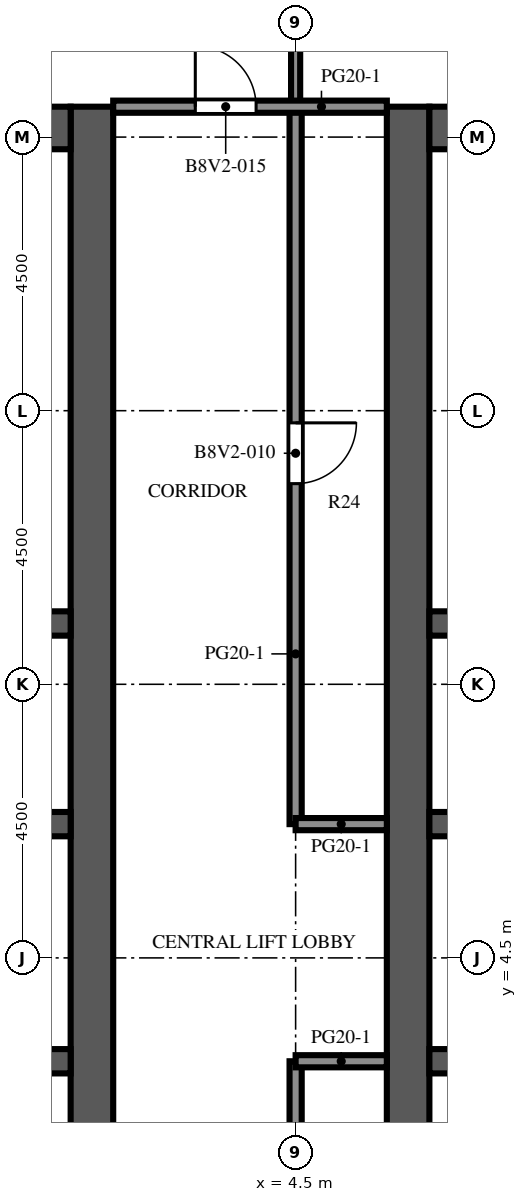
"""IFC4 building model, lengths in metres.
Left out: names, types, materials, properties, quantities, classifications, styles, units other than length and angle.
Written with IfcOpenShell. Run it as: python <this file> out.ifc"""

import sys

from ifc_helpers import new_model, si_unit, direction, frame, frame_2d, origin, place, context, subcontext, project, spatial, rectangle, extrude, element, fill, save


model = new_model("IFC4")
c1 = context("Model", 3, precision=1e-05, world=origin(), true_north=direction((0.0, 1.0)))
c2 = subcontext(c1, "Body", "Model", "MODEL_VIEW")
j1 = project(units=[si_unit("LENGTHUNIT", "METRE"), si_unit("PLANEANGLEUNIT", "RADIAN")], contexts=[c1])
p1 = place(None, origin())
s1 = spatial("IfcSite", under=j1, at=p1, CompositionType="ELEMENT")
p2 = place(p1, origin())
s2 = spatial("IfcBuilding", under=s1, at=p2, CompositionType="ELEMENT")
p3 = place(p2, frame((0.0, 0.0, 282.7)))
s3 = spatial("IfcBuildingStorey", under=s2, at=p3, CompositionType="ELEMENT", Elevation=282.7)
p4 = place(p3, frame((1.15, -9.0, 0.0), z_axis=(0.0, 0.0, 1.0), x_axis=(0.0, 1.0, 0.0)))
e1 = element("IfcWall", 1, at=p4, inside=s3, PredefinedType="SHEAR", context=c2, shape_type="SweptSolid", body=[
    extrude(rectangle(XDim=27.5, YDim=0.7, at=frame_2d((13.75, 0.0))), origin(), (0.0, 0.0, 1.0), 4.1),
])
p5 = place(p4, frame((12.55, 0.0, 0.0)))
e2 = element("IfcOpeningElement", 2, at=p5, cuts=e1, PredefinedType="OPENING", context=c2, shape_type="SweptSolid", body=[
    extrude(rectangle(XDim=2.4, YDim=2.4, at=frame_2d((1.2, 1.2))), frame((0.0, 0.36, 0.0), z_axis=(0.0, -1.0, 0.0), x_axis=(1.0, 0.0, 0.0)), (0.0, 0.0, 1.0), 0.72),
])
p6 = place(p4, frame((3.9, 0.0, 0.0)))
e3 = element("IfcOpeningElement", 3, at=p6, cuts=e1, PredefinedType="OPENING", context=c2, shape_type="SweptSolid", body=[
    extrude(rectangle(XDim=1.2, YDim=2.1, at=frame_2d((0.6, 1.05))), frame((0.0, 0.36, 0.0), z_axis=(0.0, -1.0, 0.0), x_axis=(1.0, 0.0, 0.0)), (0.0, 0.0, 1.0), 0.72),
])
p7 = place(p4, frame((22.4, 0.0, 0.0)))
e4 = element("IfcOpeningElement", 4, at=p7, cuts=e1, PredefinedType="OPENING", context=c2, shape_type="SweptSolid", body=[
    extrude(rectangle(XDim=1.2, YDim=2.1, at=frame_2d((0.6, 1.05))), frame((0.0, 0.36, 0.0), z_axis=(0.0, -1.0, 0.0), x_axis=(1.0, 0.0, 0.0)), (0.0, 0.0, 1.0), 0.72),
])
p8 = place(p3, frame((-9.8, 18.15, 0.0), z_axis=(0.0, 0.0, 1.0), x_axis=(1.0, 0.0, 0.0)))
e5 = element("IfcWall", 5, at=p8, inside=s3, PredefinedType="SHEAR", context=c2, shape_type="SweptSolid", body=[
    extrude(rectangle(XDim=10.6, YDim=0.7, at=frame_2d((5.3, 0.0))), origin(), (0.0, 0.0, 1.0), 4.1),
])
p9 = place(p3, frame((-9.8, 2.8, 0.0), z_axis=(0.0, 0.0, 1.0), x_axis=(1.0, 0.0, 0.0)))
e6 = element("IfcWall", 6, at=p9, inside=s3, PredefinedType="SHEAR", context=c2, shape_type="SweptSolid", body=[
    extrude(rectangle(XDim=10.6, YDim=0.4, at=frame_2d((5.3, 0.0))), origin(), (0.0, 0.0, 1.0), 4.1),
])
p10 = place(p9, frame((0.688, 0.0, 0.0)))
e7 = element("IfcOpeningElement", 7, at=p10, cuts=e6, PredefinedType="OPENING", context=c2, shape_type="SweptSolid", body=[
    extrude(rectangle(XDim=1.1, YDim=2.1, at=frame_2d((0.55, 1.05))), frame((0.0, 0.21, 0.0), z_axis=(0.0, -1.0, 0.0), x_axis=(1.0, 0.0, 0.0)), (0.0, 0.0, 1.0), 0.42),
])
p11 = place(p9, frame((3.438, 0.0, 0.0)))
e8 = element("IfcOpeningElement", 8, at=p11, cuts=e6, PredefinedType="OPENING", context=c2, shape_type="SweptSolid", body=[
    extrude(rectangle(XDim=1.1, YDim=2.1, at=frame_2d((0.55, 1.05))), frame((0.0, 0.21, 0.0), z_axis=(0.0, -1.0, 0.0), x_axis=(1.0, 0.0, 0.0)), (0.0, 0.0, 1.0), 0.42),
])
p12 = place(p9, frame((6.113, 0.0, 0.0)))
e9 = element("IfcOpeningElement", 9, at=p12, cuts=e6, PredefinedType="OPENING", context=c2, shape_type="SweptSolid", body=[
    extrude(rectangle(XDim=1.0, YDim=2.1, at=frame_2d((0.5, 1.05))), frame((0.0, 0.21, 0.0), z_axis=(0.0, -1.0, 0.0), x_axis=(1.0, 0.0, 0.0)), (0.0, 0.0, 1.0), 0.42),
])
p13 = place(p9, frame((8.863, 0.0, 0.0)))
e10 = element("IfcOpeningElement", 10, at=p13, cuts=e6, PredefinedType="OPENING", context=c2, shape_type="SweptSolid", body=[
    extrude(rectangle(XDim=1.0, YDim=2.1, at=frame_2d((0.5, 1.05))), frame((0.0, 0.21, 0.0), z_axis=(0.0, -1.0, 0.0), x_axis=(1.0, 0.0, 0.0)), (0.0, 0.0, 1.0), 0.42),
])
p14 = place(p3, frame((-9.8, 6.7, 0.0), z_axis=(0.0, 0.0, 1.0), x_axis=(1.0, 0.0, 0.0)))
e11 = element("IfcWall", 11, at=p14, inside=s3, PredefinedType="SHEAR", context=c2, shape_type="SweptSolid", body=[
    extrude(rectangle(XDim=10.6, YDim=0.4, at=frame_2d((5.3, 0.0))), origin(), (0.0, 0.0, 1.0), 4.1),
])
p15 = place(p14, frame((3.438, 0.0, 0.0)))
e12 = element("IfcOpeningElement", 12, at=p15, cuts=e11, PredefinedType="OPENING", context=c2, shape_type="SweptSolid", body=[
    extrude(rectangle(XDim=1.1, YDim=2.1, at=frame_2d((0.55, 1.05))), frame((0.0, 0.21, 0.0), z_axis=(0.0, -1.0, 0.0), x_axis=(1.0, 0.0, 0.0)), (0.0, 0.0, 1.0), 0.42),
])
p16 = place(p14, frame((6.062, 0.0, 0.0)))
e13 = element("IfcOpeningElement", 13, at=p16, cuts=e11, PredefinedType="OPENING", context=c2, shape_type="SweptSolid", body=[
    extrude(rectangle(XDim=1.1, YDim=2.1, at=frame_2d((0.55, 1.05))), frame((0.0, 0.21, 0.0), z_axis=(0.0, -1.0, 0.0), x_axis=(1.0, 0.0, 0.0)), (0.0, 0.0, 1.0), 0.42),
])
p17 = place(p14, frame((8.812, 0.0, 0.0)))
e14 = element("IfcOpeningElement", 14, at=p17, cuts=e11, PredefinedType="OPENING", context=c2, shape_type="SweptSolid", body=[
    extrude(rectangle(XDim=1.1, YDim=2.1, at=frame_2d((0.55, 1.05))), frame((0.0, 0.21, 0.0), z_axis=(0.0, -1.0, 0.0), x_axis=(1.0, 0.0, 0.0)), (0.0, 0.0, 1.0), 0.42),
])
p18 = place(p14, frame((0.738, 0.0, 0.0)))
e15 = element("IfcOpeningElement", 15, at=p18, cuts=e11, PredefinedType="OPENING", context=c2, shape_type="SweptSolid", body=[
    extrude(rectangle(XDim=1.0, YDim=2.1, at=frame_2d((0.5, 1.05))), frame((0.0, 0.21, 0.0), z_axis=(0.0, -1.0, 0.0), x_axis=(1.0, 0.0, 0.0)), (0.0, 0.0, 1.0), 0.42),
])
p19 = place(p3, frame((-9.8, 10.0, 0.0), z_axis=(0.0, 0.0, 1.0), x_axis=(1.0, 0.0, 0.0)))
e16 = element("IfcWall", 16, at=p19, inside=s3, PredefinedType="SHEAR", context=c2, shape_type="SweptSolid", body=[
    extrude(rectangle(XDim=10.6, YDim=0.4, at=frame_2d((5.3, 0.0))), origin(), (0.0, 0.0, 1.0), 4.1),
])
p20 = place(p3, frame((6.35, -9.0, 0.0), z_axis=(0.0, 0.0, 1.0), x_axis=(0.0, 1.0, 0.0)))
e17 = element("IfcWall", 17, at=p20, inside=s3, PredefinedType="SHEAR", context=c2, shape_type="SweptSolid", body=[
    extrude(rectangle(XDim=27.5, YDim=0.7, at=frame_2d((13.75, 0.0))), origin(), (0.0, 0.0, 1.0), 4.1),
])
p21 = place(p20, frame((12.55, 0.0, 0.0)))
e18 = element("IfcOpeningElement", 18, at=p21, cuts=e17, PredefinedType="OPENING", context=c2, shape_type="SweptSolid", body=[
    extrude(rectangle(XDim=2.4, YDim=2.4, at=frame_2d((1.2, 1.2))), frame((0.0, 0.36, 0.0), z_axis=(0.0, -1.0, 0.0), x_axis=(1.0, 0.0, 0.0)), (0.0, 0.0, 1.0), 0.72),
])
p22 = place(p20, frame((3.9, 0.0, 0.0)))
e19 = element("IfcOpeningElement", 19, at=p22, cuts=e17, PredefinedType="OPENING", context=c2, shape_type="SweptSolid", body=[
    extrude(rectangle(XDim=1.2, YDim=2.1, at=frame_2d((0.6, 1.05))), frame((0.0, 0.36, 0.0), z_axis=(0.0, -1.0, 0.0), x_axis=(1.0, 0.0, 0.0)), (0.0, 0.0, 1.0), 0.72),
])
p23 = place(p20, frame((22.4, 0.0, 0.0)))
e20 = element("IfcOpeningElement", 20, at=p23, cuts=e17, PredefinedType="OPENING", context=c2, shape_type="SweptSolid", body=[
    extrude(rectangle(XDim=1.2, YDim=2.1, at=frame_2d((0.6, 1.05))), frame((0.0, 0.36, 0.0), z_axis=(0.0, -1.0, 0.0), x_axis=(1.0, 0.0, 0.0)), (0.0, 0.0, 1.0), 0.72),
])
p24 = place(p3, frame((6.7, 18.15, 0.0), z_axis=(0.0, 0.0, 1.0), x_axis=(1.0, 0.0, 0.0)))
e21 = element("IfcWall", 21, at=p24, inside=s3, PredefinedType="SHEAR", context=c2, shape_type="SweptSolid", body=[
    extrude(rectangle(XDim=10.6, YDim=0.7, at=frame_2d((5.3, 0.0))), origin(), (0.0, 0.0, 1.0), 4.1),
])
p25 = place(p3, frame((6.7, 2.8, 0.0), z_axis=(0.0, 0.0, 1.0), x_axis=(1.0, 0.0, 0.0)))
e22 = element("IfcWall", 22, at=p25, inside=s3, PredefinedType="SHEAR", context=c2, shape_type="SweptSolid", body=[
    extrude(rectangle(XDim=10.6, YDim=0.4, at=frame_2d((5.3, 0.0))), origin(), (0.0, 0.0, 1.0), 4.1),
])
p26 = place(p25, frame((0.688, 0.0, 0.0)))
e23 = element("IfcOpeningElement", 23, at=p26, cuts=e22, PredefinedType="OPENING", context=c2, shape_type="SweptSolid", body=[
    extrude(rectangle(XDim=1.1, YDim=2.1, at=frame_2d((0.55, 1.05))), frame((0.0, 0.21, 0.0), z_axis=(0.0, -1.0, 0.0), x_axis=(1.0, 0.0, 0.0)), (0.0, 0.0, 1.0), 0.42),
])
p27 = place(p25, frame((3.438, 0.0, 0.0)))
e24 = element("IfcOpeningElement", 24, at=p27, cuts=e22, PredefinedType="OPENING", context=c2, shape_type="SweptSolid", body=[
    extrude(rectangle(XDim=1.1, YDim=2.1, at=frame_2d((0.55, 1.05))), frame((0.0, 0.21, 0.0), z_axis=(0.0, -1.0, 0.0), x_axis=(1.0, 0.0, 0.0)), (0.0, 0.0, 1.0), 0.42),
])
p28 = place(p25, frame((6.113, 0.0, 0.0)))
e25 = element("IfcOpeningElement", 25, at=p28, cuts=e22, PredefinedType="OPENING", context=c2, shape_type="SweptSolid", body=[
    extrude(rectangle(XDim=1.0, YDim=2.1, at=frame_2d((0.5, 1.05))), frame((0.0, 0.21, 0.0), z_axis=(0.0, -1.0, 0.0), x_axis=(1.0, 0.0, 0.0)), (0.0, 0.0, 1.0), 0.42),
])
p29 = place(p25, frame((8.863, 0.0, 0.0)))
e26 = element("IfcOpeningElement", 26, at=p29, cuts=e22, PredefinedType="OPENING", context=c2, shape_type="SweptSolid", body=[
    extrude(rectangle(XDim=1.0, YDim=2.1, at=frame_2d((0.5, 1.05))), frame((0.0, 0.21, 0.0), z_axis=(0.0, -1.0, 0.0), x_axis=(1.0, 0.0, 0.0)), (0.0, 0.0, 1.0), 0.42),
])
p30 = place(p3, frame((6.7, 6.7, 0.0), z_axis=(0.0, 0.0, 1.0), x_axis=(1.0, 0.0, 0.0)))
e27 = element("IfcWall", 27, at=p30, inside=s3, PredefinedType="SHEAR", context=c2, shape_type="SweptSolid", body=[
    extrude(rectangle(XDim=10.6, YDim=0.4, at=frame_2d((5.3, 0.0))), origin(), (0.0, 0.0, 1.0), 4.1),
])
p31 = place(p30, frame((3.438, 0.0, 0.0)))
e28 = element("IfcOpeningElement", 28, at=p31, cuts=e27, PredefinedType="OPENING", context=c2, shape_type="SweptSolid", body=[
    extrude(rectangle(XDim=1.1, YDim=2.1, at=frame_2d((0.55, 1.05))), frame((0.0, 0.21, 0.0), z_axis=(0.0, -1.0, 0.0), x_axis=(1.0, 0.0, 0.0)), (0.0, 0.0, 1.0), 0.42),
])
p32 = place(p30, frame((6.062, 0.0, 0.0)))
e29 = element("IfcOpeningElement", 29, at=p32, cuts=e27, PredefinedType="OPENING", context=c2, shape_type="SweptSolid", body=[
    extrude(rectangle(XDim=1.1, YDim=2.1, at=frame_2d((0.55, 1.05))), frame((0.0, 0.21, 0.0), z_axis=(0.0, -1.0, 0.0), x_axis=(1.0, 0.0, 0.0)), (0.0, 0.0, 1.0), 0.42),
])
p33 = place(p30, frame((8.812, 0.0, 0.0)))
e30 = element("IfcOpeningElement", 30, at=p33, cuts=e27, PredefinedType="OPENING", context=c2, shape_type="SweptSolid", body=[
    extrude(rectangle(XDim=1.1, YDim=2.1, at=frame_2d((0.55, 1.05))), frame((0.0, 0.21, 0.0), z_axis=(0.0, -1.0, 0.0), x_axis=(1.0, 0.0, 0.0)), (0.0, 0.0, 1.0), 0.42),
])
p34 = place(p30, frame((0.738, 0.0, 0.0)))
e31 = element("IfcOpeningElement", 31, at=p34, cuts=e27, PredefinedType="OPENING", context=c2, shape_type="SweptSolid", body=[
    extrude(rectangle(XDim=1.0, YDim=2.1, at=frame_2d((0.5, 1.05))), frame((0.0, 0.21, 0.0), z_axis=(0.0, -1.0, 0.0), x_axis=(1.0, 0.0, 0.0)), (0.0, 0.0, 1.0), 0.42),
])
p35 = place(p3, frame((6.7, 10.0, 0.0), z_axis=(0.0, 0.0, 1.0), x_axis=(1.0, 0.0, 0.0)))
e32 = element("IfcWall", 32, at=p35, inside=s3, PredefinedType="SHEAR", context=c2, shape_type="SweptSolid", body=[
    extrude(rectangle(XDim=10.6, YDim=0.4, at=frame_2d((5.3, 0.0))), origin(), (0.0, 0.0, 1.0), 4.1),
])
p36 = place(p3, frame((4.5, 26.6, 0.0), z_axis=(0.0, 0.0, 1.0), x_axis=(0.0, -1.0, 0.0)))
e33 = element("IfcWall", 33, at=p36, inside=s3, PredefinedType="PARTITIONING", context=c2, shape_type="SweptSolid", body=[
    extrude(rectangle(XDim=8.1, YDim=0.15, at=frame_2d((4.05, 0.0))), origin(), (0.0, 0.0, 1.0), 3.65),
])
p37 = place(p36, frame((4.0, 0.0, 0.0)))
e34 = element("IfcOpeningElement", 34, at=p37, cuts=e33, PredefinedType="OPENING", context=c2, shape_type="SweptSolid", body=[
    extrude(rectangle(XDim=1.0, YDim=2.1, at=frame_2d((0.5, 1.05))), frame((0.0, 0.085, 0.0), z_axis=(0.0, -1.0, 0.0), x_axis=(1.0, 0.0, 0.0)), (0.0, 0.0, 1.0), 0.17),
])
p38 = place(p3, frame((4.5, 2.8, 0.0), z_axis=(0.0, 0.0, 1.0), x_axis=(0.0, -1.0, 0.0)))
e35 = element("IfcWall", 35, at=p38, inside=s3, PredefinedType="PARTITIONING", context=c2, shape_type="SweptSolid", body=[
    extrude(rectangle(XDim=6.3, YDim=0.2, at=frame_2d((3.15, 0.0))), origin(), (0.0, 0.0, 1.0), 3.65),
])
p39 = place(p38, frame((2.2, 0.0, 0.0)))
e36 = element("IfcOpeningElement", 36, at=p39, cuts=e35, PredefinedType="OPENING", context=c2, shape_type="SweptSolid", body=[
    extrude(rectangle(XDim=1.0, YDim=2.1, at=frame_2d((0.5, 1.05))), frame((0.0, 0.11, 0.0), z_axis=(0.0, -1.0, 0.0), x_axis=(1.0, 0.0, 0.0)), (0.0, 0.0, 1.0), 0.22),
])
p40 = place(p3, frame((4.5, 18.5, 0.0), z_axis=(0.0, 0.0, 1.0), x_axis=(0.0, -1.0, 0.0)))
e37 = element("IfcWall", 37, at=p40, inside=s3, PredefinedType="PARTITIONING", context=c2, shape_type="SweptSolid", body=[
    extrude(rectangle(XDim=11.8, YDim=0.2, at=frame_2d((5.9, 0.0))), origin(), (0.0, 0.0, 1.0), 3.65),
])
p41 = place(p40, frame((5.2, 0.0, 0.0)))
e38 = element("IfcOpeningElement", 38, at=p41, cuts=e37, PredefinedType="OPENING", context=c2, shape_type="SweptSolid", body=[
    extrude(rectangle(XDim=1.0, YDim=2.1, at=frame_2d((0.5, 1.05))), frame((0.0, 0.11, 0.0), z_axis=(0.0, -1.0, 0.0), x_axis=(1.0, 0.0, 0.0)), (0.0, 0.0, 1.0), 0.22),
])
for number, where, z_axis, x_axis in (
    (39, (4.5, 2.8, 0.0), (0.0, 0.0, 1.0), (1.0, 0.0, 0.0)),
    (40, (4.5, 6.7, 0.0), (0.0, 0.0, 1.0), (1.0, 0.0, 0.0)),
):
    element("IfcWall", number, at=place(p3, frame(where, z_axis=z_axis, x_axis=x_axis)), inside=s3, PredefinedType="PARTITIONING", context=c2, shape_type="SweptSolid", body=[
        extrude(rectangle(XDim=1.5, YDim=0.2, at=frame_2d((0.75, 0.0))), origin(), (0.0, 0.0, 1.0), 3.65),
    ])
p42 = place(p3, frame((1.5, 18.5, 0.0), z_axis=(0.0, 0.0, 1.0), x_axis=(1.0, 0.0, 0.0)))
e41 = element("IfcWall", 41, at=p42, inside=s3, PredefinedType="PARTITIONING", context=c2, shape_type="SweptSolid", body=[
    extrude(rectangle(XDim=4.5, YDim=0.2, at=frame_2d((2.25, 0.0))), origin(), (0.0, 0.0, 1.0), 3.65),
])
p43 = place(p42, frame((1.35, 0.0, 0.0)))
e42 = element("IfcOpeningElement", 42, at=p43, cuts=e41, PredefinedType="OPENING", context=c2, shape_type="SweptSolid", body=[
    extrude(rectangle(XDim=1.0, YDim=2.1, at=frame_2d((0.5, 1.05))), frame((0.0, 0.11, 0.0), z_axis=(0.0, -1.0, 0.0), x_axis=(1.0, 0.0, 0.0)), (0.0, 0.0, 1.0), 0.22),
])
p44 = place(p5, origin())
e43 = element("IfcDoor", 43, at=p44, inside=s3, OperationType="DOUBLE_DOOR_DOUBLE_SWING", PredefinedType="DOOR", context=c2, shape_type="SweptSolid", body=[
    extrude(rectangle(XDim=2.4, YDim=2.4, at=frame_2d((1.2, 1.2))), frame((0.0, 0.025, 0.0), z_axis=(0.0, -1.0, 0.0), x_axis=(1.0, 0.0, 0.0)), (0.0, 0.0, 1.0), 0.05),
])
fill(e2, e43)
p45 = place(p21, origin())
e44 = element("IfcDoor", 44, at=p45, inside=s3, OperationType="DOUBLE_DOOR_DOUBLE_SWING", PredefinedType="DOOR", context=c2, shape_type="SweptSolid", body=[
    extrude(rectangle(XDim=2.4, YDim=2.4, at=frame_2d((1.2, 1.2))), frame((0.0, 0.025, 0.0), z_axis=(0.0, -1.0, 0.0), x_axis=(1.0, 0.0, 0.0)), (0.0, 0.0, 1.0), 0.05),
])
fill(e18, e44)
p46 = place(p7, origin())
e45 = element("IfcDoor", 45, at=p46, inside=s3, OperationType="SINGLE_SWING_LEFT", PredefinedType="DOOR", context=c2, shape_type="SweptSolid", body=[
    extrude(rectangle(XDim=1.2, YDim=2.1, at=frame_2d((0.6, 1.05))), frame((0.0, 0.325, 0.0), z_axis=(0.0, -1.0, 0.0), x_axis=(1.0, 0.0, 0.0)), (0.0, 0.0, 1.0), 0.05),
])
fill(e4, e45)
p47 = place(p23, origin())
e46 = element("IfcDoor", 46, at=p47, inside=s3, OperationType="SINGLE_SWING_RIGHT", PredefinedType="DOOR", context=c2, shape_type="SweptSolid", body=[
    extrude(rectangle(XDim=1.2, YDim=2.1, at=frame_2d((0.6, 1.05))), frame((0.0, -0.275, 0.0), z_axis=(0.0, -1.0, 0.0), x_axis=(1.0, 0.0, 0.0)), (0.0, 0.0, 1.0), 0.05),
])
fill(e20, e46)
p48 = place(p41, origin())
e47 = element("IfcDoor", 47, at=p48, inside=s3, OperationType="SINGLE_SWING_LEFT", PredefinedType="DOOR", context=c2, shape_type="SweptSolid", body=[
    extrude(rectangle(XDim=1.0, YDim=2.1, at=frame_2d((0.5, 1.05))), frame((0.0, 0.025, 0.0), z_axis=(0.0, -1.0, 0.0), x_axis=(1.0, 0.0, 0.0)), (0.0, 0.0, 1.0), 0.05),
])
fill(e38, e47)
p49 = place(p43, origin())
e48 = element("IfcDoor", 48, at=p49, inside=s3, OperationType="SINGLE_SWING_LEFT", PredefinedType="DOOR", context=c2, shape_type="SweptSolid", body=[
    extrude(rectangle(XDim=1.0, YDim=2.1, at=frame_2d((0.5, 1.05))), frame((0.0, 0.025, 0.0), z_axis=(0.0, -1.0, 0.0), x_axis=(1.0, 0.0, 0.0)), (0.0, 0.0, 1.0), 0.05),
])
fill(e42, e48)
save(model, sys.argv[1])
